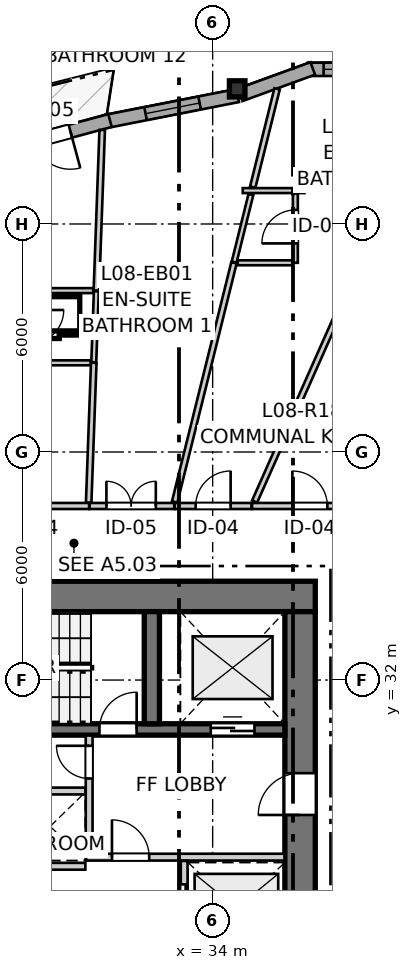
"""IFC4 building model, lengths in metres.
Left out: names, types, materials, properties, quantities, classifications, styles, units other than length and angle.
Written with IfcOpenShell. Run it as: python <this file> out.ifc"""

import sys

from ifc_helpers import new_model, si_unit, direction, frame, frame_2d, origin, origin_2d, place, context, subcontext, project, spatial, rectangle, i_section, extrude, source, transform, mapped, element, fill, save


model = new_model("IFC4")
c1 = context("Model", 3, precision=1e-05, world=origin(), true_north=direction((0.0, 1.0)))
c2 = subcontext(c1, "Body", "Model", "MODEL_VIEW")
j1 = project(units=[si_unit("LENGTHUNIT", "METRE"), si_unit("PLANEANGLEUNIT", "RADIAN")], contexts=[c1])
p1 = place(None, origin())
s1 = spatial("IfcSite", under=j1, at=p1, CompositionType="ELEMENT")
p2 = place(p1, origin())
s2 = spatial("IfcBuilding", under=s1, at=p2, CompositionType="ELEMENT")
p3 = place(p2, frame((0.0, 0.0, 30.2)))
s3 = spatial("IfcBuildingStorey", under=s2, at=p3, CompositionType="ELEMENT", Elevation=30.2)
p4 = place(p3, frame((36.7, 34.2, 0.0), z_axis=(0.0, 0.0, 1.0), x_axis=(-1.0, 0.0, 0.0)))
e1 = element("IfcWall", 1, at=p4, inside=s3, PredefinedType="SHEAR", context=c2, shape_type="SweptSolid", body=[
    extrude(rectangle(XDim=12.7, YDim=0.8, at=frame_2d((6.35, 0.0))), origin(), (0.0, 0.0, 1.0), 2.935),
])
p5 = place(p3, frame((36.3, 18.2, 0.0), z_axis=(0.0, 0.0, 1.0), x_axis=(0.0, 1.0, 0.0)))
e2 = element("IfcWall", 2, at=p5, inside=s3, PredefinedType="SHEAR", context=c2, shape_type="SweptSolid", body=[
    extrude(rectangle(XDim=15.6, YDim=0.8, at=frame_2d((7.8, 0.0))), origin(), (0.0, 0.0, 1.0), 2.935),
])
p6 = place(p5, frame((4.25, 0.0, 0.0)))
e3 = element("IfcOpeningElement", 3, at=p6, cuts=e2, PredefinedType="OPENING", context=c2, shape_type="SweptSolid", body=[
    extrude(rectangle(XDim=1.1, YDim=2.15, at=frame_2d((0.55, 1.075))), frame((0.0, 0.41, 0.0), z_axis=(0.0, -1.0, 0.0), x_axis=(1.0, 0.0, 0.0)), (0.0, 0.0, 1.0), 0.82),
])
p7 = place(p5, frame((10.25, 0.0, 0.0)))
e4 = element("IfcOpeningElement", 4, at=p7, cuts=e2, PredefinedType="OPENING", context=c2, shape_type="SweptSolid", body=[
    extrude(rectangle(XDim=1.1, YDim=2.15, at=frame_2d((0.55, 1.075))), frame((0.0, 0.41, 0.0), z_axis=(0.0, -1.0, 0.0), x_axis=(1.0, 0.0, 0.0)), (0.0, 0.0, 1.0), 0.82),
])
p8 = place(p3, frame((24.8, 30.7, 0.0), z_axis=(0.0, 0.0, 1.0), x_axis=(1.0, 0.0, 0.0)))
e5 = element("IfcWall", 5, at=p8, inside=s3, PredefinedType="SHEAR", context=c2, shape_type="SweptSolid", body=[
    extrude(rectangle(XDim=11.1, YDim=0.3, at=frame_2d((5.55, 0.0))), origin(), (0.0, 0.0, 1.0), 2.935),
])
p9 = place(p8, frame((6.22, 0.0, 0.0)))
e6 = element("IfcOpeningElement", 6, at=p9, cuts=e5, PredefinedType="OPENING", context=c2, shape_type="SweptSolid", body=[
    extrude(rectangle(XDim=0.98, YDim=2.15, at=frame_2d((0.49, 1.075))), frame((0.0, 0.16, 0.0), z_axis=(0.0, -1.0, 0.0), x_axis=(1.0, 0.0, 0.0)), (0.0, 0.0, 1.0), 0.32),
])
p10 = place(p8, frame((9.15, 0.0, 0.0)))
e7 = element("IfcOpeningElement", 7, at=p10, cuts=e5, PredefinedType="OPENING", context=c2, shape_type="SweptSolid", body=[
    extrude(rectangle(XDim=1.15, YDim=2.15, at=frame_2d((0.575, 1.075))), frame((0.0, 0.16, 0.0), z_axis=(0.0, -1.0, 0.0), x_axis=(1.0, 0.0, 0.0)), (0.0, 0.0, 1.0), 0.32),
])
p11 = place(p3, frame((32.4, 30.85, 0.0), z_axis=(0.0, 0.0, 1.0), x_axis=(0.0, 1.0, 0.0)))
e8 = element("IfcWall", 8, at=p11, inside=s3, PredefinedType="SHEAR", context=c2, shape_type="SweptSolid", body=[
    extrude(rectangle(XDim=2.95, YDim=0.4, at=frame_2d((1.475, 0.0))), origin(), (0.0, 0.0, 1.0), 2.935),
])
m1 = source(origin(), c2, "Body", "SweptSolid", [
    extrude(i_section(OverallWidth=0.409, OverallDepth=0.425, WebThickness=0.03, FlangeThickness=0.048, FilletRadius=0.015, at=origin_2d()), origin(), (0.0, 0.0, 1.0), 2.935),
])
p12 = place(p3, frame((34.645, 47.555, 0.0), z_axis=(0.0, 0.0, 1.0), x_axis=(1.0, 0.0, 0.0)))
e9 = element("IfcColumn", 9, at=p12, inside=s3, PredefinedType="PILASTER", context=c2, shape_type="MappedRepresentation", body=[
    mapped(m1, transform((0.0, 0.0, 0.0), x_axis=(1.0, 0.0, 0.0), y_axis=(0.0, 1.0, 0.0), z_axis=(0.0, 0.0, 1.0), scale=1.0)),
])
p13 = place(p3, frame((38.59, 48.069, 0.0), z_axis=(0.0, 0.0, 1.0), x_axis=(-1.0, 0.0, 0.0)))
e10 = element("IfcWall", 10, at=p13, inside=s3, PredefinedType="SOLIDWALL", context=c2, shape_type="SweptSolid", body=[
    extrude(rectangle(XDim=2.09, YDim=0.35, at=frame_2d((1.045, 0.0))), origin(), (0.0, 0.0, 1.0), 2.415),
])
p14 = place(p13, frame((0.42, 0.0, 0.82)))
e11 = element("IfcOpeningElement", 11, at=p14, cuts=e10, PredefinedType="OPENING", context=c2, shape_type="SweptSolid", body=[
    extrude(rectangle(XDim=1.25, YDim=1.35, at=frame_2d((0.625, 0.675))), frame((0.0, 0.185, 0.0), z_axis=(0.0, -1.0, 0.0), x_axis=(1.0, 0.0, 0.0)), (0.0, 0.0, 1.0), 0.37),
])
p15 = place(p3, frame((36.633, 48.093, 0.0), z_axis=(0.0, 0.0, 1.0), x_axis=(-0.939691662178, -0.342022777067, 0.0)))
e12 = element("IfcWall", 12, at=p15, inside=s3, PredefinedType="SOLIDWALL", context=c2, shape_type="SweptSolid", body=[
    extrude(rectangle(XDim=2.032, YDim=0.35, at=frame_2d((1.016, 0.0))), origin(), (0.0, 0.0, 1.0), 2.415),
])
p16 = place(p3, frame((34.659, 47.38, 0.0), z_axis=(0.0, 0.0, 1.0), x_axis=(-0.981222284826, -0.19288034571, 0.0)))
e13 = element("IfcWall", 13, at=p16, inside=s3, PredefinedType="SOLIDWALL", context=c2, shape_type="SweptSolid", body=[
    extrude(rectangle(XDim=3.512, YDim=0.35, at=frame_2d((1.756, 0.0))), origin(), (0.0, 0.0, 1.0), 2.415),
])
p17 = place(p16, frame((1.021, 0.0, 0.82)))
e14 = element("IfcOpeningElement", 14, at=p17, cuts=e13, PredefinedType="OPENING", context=c2, shape_type="SweptSolid", body=[
    extrude(rectangle(XDim=1.45, YDim=1.25, at=frame_2d((0.725, 0.625))), frame((0.0, 0.185, 0.0), z_axis=(0.0, -1.0, 0.0), x_axis=(1.0, 0.0, 0.0)), (0.0, 0.0, 1.0), 0.37),
])
p18 = place(p3, frame((31.298, 46.722, 0.0), z_axis=(0.0, 0.0, 1.0), x_axis=(-0.965455913242, -0.260566459057, 0.0)))
e15 = element("IfcWall", 15, at=p18, inside=s3, PredefinedType="SOLIDWALL", context=c2, shape_type="SweptSolid", body=[
    extrude(rectangle(XDim=3.159, YDim=0.35, at=frame_2d((1.58, 0.0))), origin(), (0.0, 0.0, 1.0), 2.415),
])
p19 = place(p18, frame((1.08, 0.0, 0.0)))
e16 = element("IfcOpeningElement", 16, at=p19, cuts=e15, PredefinedType="OPENING", context=c2, shape_type="SweptSolid", body=[
    extrude(rectangle(XDim=1.0, YDim=2.1, at=frame_2d((0.5, 1.05))), frame((0.0, 0.185, 0.0), z_axis=(0.0, -1.0, 0.0), x_axis=(1.0, 0.0, 0.0)), (0.0, 0.0, 1.0), 0.37),
])
p20 = place(p3, frame((30.75, 27.43, 0.0), z_axis=(0.0, 0.0, 1.0), x_axis=(0.0, 1.0, 0.0)))
e17 = element("IfcWall", 17, at=p20, inside=s3, PredefinedType="PARTITIONING", context=c2, shape_type="SweptSolid", body=[
    extrude(rectangle(XDim=3.11, YDim=0.18, at=frame_2d((1.555, 0.0))), origin(), (0.0, 0.0, 1.0), 2.935),
])
p21 = place(p20, frame((1.98, 0.0, 0.0)))
e18 = element("IfcOpeningElement", 18, at=p21, cuts=e17, PredefinedType="OPENING", context=c2, shape_type="SweptSolid", body=[
    extrude(rectangle(XDim=0.86, YDim=2.05, at=frame_2d((0.43, 1.025))), frame((0.0, 0.1, 0.0), z_axis=(0.0, -1.0, 0.0), x_axis=(1.0, 0.0, 0.0)), (0.0, 0.0, 1.0), 0.2),
])
p22 = place(p3, frame((30.67, 27.34, 0.0), z_axis=(0.0, 0.0, 1.0), x_axis=(1.0, 0.0, 0.0)))
e19 = element("IfcWall", 19, at=p22, inside=s3, PredefinedType="PARTITIONING", context=c2, shape_type="SweptSolid", body=[
    extrude(rectangle(XDim=5.22, YDim=0.18, at=frame_2d((2.61, 0.0))), origin(), (0.0, 0.0, 1.0), 2.935),
])
p23 = place(p22, frame((0.68, 0.0, 0.0)))
e20 = element("IfcOpeningElement", 20, at=p23, cuts=e19, PredefinedType="OPENING", context=c2, shape_type="SweptSolid", body=[
    extrude(rectangle(XDim=0.98, YDim=2.15, at=frame_2d((0.49, 1.075))), frame((0.0, 0.1, 0.0), z_axis=(0.0, -1.0, 0.0), x_axis=(1.0, 0.0, 0.0)), (0.0, 0.0, 1.0), 0.2),
])
p24 = place(p3, frame((33.25, 24.76, 0.0), z_axis=(0.0, 0.0, 1.0), x_axis=(0.0, 1.0, 0.0)))
e21 = element("IfcWall", 21, at=p24, inside=s3, PredefinedType="PARTITIONING", context=c2, shape_type="SweptSolid", body=[
    extrude(rectangle(XDim=2.48, YDim=0.18, at=frame_2d((1.24, 0.0))), origin(), (0.0, 0.0, 1.0), 2.935),
])
p25 = place(p24, frame((0.615, 0.0, 0.0)))
e22 = element("IfcOpeningElement", 22, at=p25, cuts=e21, PredefinedType="OPENING", context=c2, shape_type="SweptSolid", body=[
    extrude(rectangle(XDim=1.25, YDim=2.15, at=frame_2d((0.625, 1.075))), frame((0.0, 0.1, 0.0), z_axis=(0.0, -1.0, 0.0), x_axis=(1.0, 0.0, 0.0)), (0.0, 0.0, 1.0), 0.2),
])
p26 = place(p3, frame((24.81, 29.08, 0.0), z_axis=(0.0, 0.0, 1.0), x_axis=(1.0, 0.0, 0.0)))
e23 = element("IfcWall", 23, at=p26, inside=s3, PredefinedType="PARTITIONING", context=c2, shape_type="SweptSolid", body=[
    extrude(rectangle(XDim=5.84, YDim=0.18, at=frame_2d((2.92, 0.0))), origin(), (0.0, 0.0, 1.0), 2.935),
])
p27 = place(p3, frame((28.825, 27.1, 0.0), z_axis=(0.0, 0.0, 1.0), x_axis=(1.0, 0.0, 0.0)))
e24 = element("IfcWall", 24, at=p27, inside=s3, PredefinedType="PARTITIONING", context=c2, shape_type="SweptSolid", body=[
    extrude(rectangle(XDim=1.825, YDim=0.18, at=frame_2d((0.913, 0.0))), origin(), (0.0, 0.0, 1.0), 2.935),
])
p28 = place(p3, frame((35.036, 36.58, 0.0), z_axis=(0.0, 0.0, 1.0), x_axis=(1.0, 0.0, 0.0)))
e25 = element("IfcWall", 25, at=p28, inside=s3, PredefinedType="PARTITIONING", context=c2, shape_type="SweptSolid", body=[
    extrude(rectangle(XDim=3.045, YDim=0.16, at=frame_2d((1.522, 0.0))), origin(), (0.0, 0.0, 1.0), 2.935),
])
p29 = place(p28, frame((1.062, 0.0, 0.0)))
e26 = element("IfcOpeningElement", 26, at=p29, cuts=e25, PredefinedType="OPENING", context=c2, shape_type="SweptSolid", body=[
    extrude(rectangle(XDim=0.92, YDim=2.1, at=frame_2d((0.46, 1.05))), frame((0.0, 0.09, 0.0), z_axis=(0.0, -1.0, 0.0), x_axis=(1.0, 0.0, 0.0)), (0.0, 0.0, 1.0), 0.18),
])
p30 = place(p3, frame((27.846, 36.58, 0.0), z_axis=(0.0, 0.0, 1.0), x_axis=(1.0, 0.0, 0.0)))
e27 = element("IfcWall", 27, at=p30, inside=s3, PredefinedType="PARTITIONING", context=c2, shape_type="SweptSolid", body=[
    extrude(rectangle(XDim=2.903, YDim=0.16, at=frame_2d((1.452, 0.0))), origin(), (0.0, 0.0, 1.0), 2.935),
])
p31 = place(p30, frame((0.969, 0.0, 0.0)))
e28 = element("IfcOpeningElement", 28, at=p31, cuts=e27, PredefinedType="OPENING", context=c2, shape_type="SweptSolid", body=[
    extrude(rectangle(XDim=0.92, YDim=2.1, at=frame_2d((0.46, 1.05))), frame((0.0, 0.09, 0.0), z_axis=(0.0, -1.0, 0.0), x_axis=(1.0, 0.0, 0.0)), (0.0, 0.0, 1.0), 0.18),
])
p32 = place(p3, frame((30.764, 36.58, 0.0), z_axis=(0.0, 0.0, 1.0), x_axis=(1.0, 0.0, 0.0)))
e29 = element("IfcWall", 29, at=p32, inside=s3, PredefinedType="PARTITIONING", context=c2, shape_type="SweptSolid", body=[
    extrude(rectangle(XDim=2.225, YDim=0.16, at=frame_2d((1.113, 0.0))), origin(), (0.0, 0.0, 1.0), 2.935),
])
p33 = place(p32, frame((0.44, 0.0, 0.0)))
e30 = element("IfcOpeningElement", 30, at=p33, cuts=e29, PredefinedType="OPENING", context=c2, shape_type="SweptSolid", body=[
    extrude(rectangle(XDim=1.3, YDim=2.1, at=frame_2d((0.65, 1.05))), frame((0.0, 0.09, 0.0), z_axis=(0.0, -1.0, 0.0), x_axis=(1.0, 0.0, 0.0)), (0.0, 0.0, 1.0), 0.18),
])
p34 = place(p3, frame((33.004, 36.58, 0.0), z_axis=(0.0, 0.0, 1.0), x_axis=(1.0, 0.0, 0.0)))
e31 = element("IfcWall", 31, at=p34, inside=s3, PredefinedType="PARTITIONING", context=c2, shape_type="SweptSolid", body=[
    extrude(rectangle(XDim=2.017, YDim=0.16, at=frame_2d((1.009, 0.0))), origin(), (0.0, 0.0, 1.0), 2.935),
])
p35 = place(p34, frame((0.549, 0.0, 0.0)))
e32 = element("IfcOpeningElement", 32, at=p35, cuts=e31, PredefinedType="OPENING", context=c2, shape_type="SweptSolid", body=[
    extrude(rectangle(XDim=0.92, YDim=2.1, at=frame_2d((0.46, 1.05))), frame((0.0, 0.09, 0.0), z_axis=(0.0, -1.0, 0.0), x_axis=(1.0, 0.0, 0.0)), (0.0, 0.0, 1.0), 0.18),
])
p36 = place(p3, frame((36.176, 42.979, 0.0), z_axis=(0.0, 0.0, 1.0), x_axis=(0.0, 1.0, 0.0)))
e33 = element("IfcWall", 33, at=p36, inside=s3, PredefinedType="PARTITIONING", context=c2, shape_type="SweptSolid", body=[
    extrude(rectangle(XDim=1.827, YDim=0.13, at=frame_2d((0.914, 0.0))), origin(), (0.0, 0.0, 1.0), 2.935),
])
p37 = place(p36, frame((0.51, 0.0, 0.0)))
e34 = element("IfcOpeningElement", 34, at=p37, cuts=e33, PredefinedType="OPENING", context=c2, shape_type="SweptSolid", body=[
    extrude(rectangle(XDim=0.88, YDim=2.05, at=frame_2d((0.44, 1.025))), frame((0.0, 0.075, 0.0), z_axis=(0.0, -1.0, 0.0), x_axis=(1.0, 0.0, 0.0)), (0.0, 0.0, 1.0), 0.15),
])
p38 = place(p3, frame((35.104, 36.697, 0.0), z_axis=(0.0, 0.0, 1.0), x_axis=(0.406121034368, 0.913819295837, 0.0)))
e35 = element("IfcWall", 35, at=p38, inside=s3, PredefinedType="PARTITIONING", context=c2, shape_type="SweptSolid", body=[
    extrude(rectangle(XDim=11.695, YDim=0.145, at=frame_2d((5.848, 0.0))), origin(), (0.0, 0.0, 1.0), 2.935),
])
p39 = place(p3, frame((33.0, 36.685, 0.0), z_axis=(0.0, 0.0, 1.0), x_axis=(0.240736846637, 0.970590423748, 0.0)))
e36 = element("IfcWall", 36, at=p39, inside=s3, PredefinedType="PARTITIONING", context=c2, shape_type="SweptSolid", body=[
    extrude(rectangle(XDim=6.484, YDim=0.145, at=frame_2d((3.242, 0.0))), origin(), (0.0, 0.0, 1.0), 2.935),
])
p40 = place(p3, frame((30.94, 42.247, 0.0), z_axis=(0.0, 0.0, 1.0), x_axis=(0.03624948077, 0.999342771597, 0.0)))
e37 = element("IfcWall", 37, at=p40, inside=s3, PredefinedType="PARTITIONING", context=c2, shape_type="SweptSolid", body=[
    extrude(rectangle(XDim=4.229, YDim=0.145, at=frame_2d((2.115, 0.0))), origin(), (0.0, 0.0, 1.0), 2.935),
])
p41 = place(p3, frame((30.737, 36.671, 0.0), z_axis=(0.0, 0.0, 1.0), x_axis=(0.036368539535, 0.999338445839, 0.0)))
e38 = element("IfcWall", 38, at=p41, inside=s3, PredefinedType="PARTITIONING", context=c2, shape_type="SweptSolid", body=[
    extrude(rectangle(XDim=3.679, YDim=0.145, at=frame_2d((1.839, 0.0))), origin(), (0.0, 0.0, 1.0), 2.935),
])
p42 = place(p3, frame((35.054, 44.969, 0.0), z_axis=(0.0, 0.0, 1.0), x_axis=(0.240615617293, 0.970620484388, 0.0)))
e39 = element("IfcWall", 39, at=p42, inside=s3, PredefinedType="PARTITIONING", context=c2, shape_type="SweptSolid", body=[
    extrude(rectangle(XDim=2.664, YDim=0.145, at=frame_2d((1.332, 0.0))), origin(), (0.0, 0.0, 1.0), 2.935),
])
p43 = place(p3, frame((34.565, 42.994, 0.0), z_axis=(0.0, 0.0, 1.0), x_axis=(0.240658084914, 0.970609955732, 0.0)))
e40 = element("IfcWall", 40, at=p43, inside=s3, PredefinedType="PARTITIONING", context=c2, shape_type="SweptSolid", body=[
    extrude(rectangle(XDim=1.836, YDim=0.13, at=frame_2d((0.918, 0.0))), origin(), (0.0, 0.0, 1.0), 2.935),
])
p44 = place(p3, frame((30.872, 40.362, 0.0), z_axis=(0.0, 0.0, 1.0), x_axis=(0.036273279858, 0.999341908042, 0.0)))
e41 = element("IfcWall", 41, at=p44, inside=s3, PredefinedType="PARTITIONING", context=c2, shape_type="SweptSolid", body=[
    extrude(rectangle(XDim=1.871, YDim=0.13, at=frame_2d((0.936, 0.0))), origin(), (0.0, 0.0, 1.0), 2.935),
])
p45 = place(p3, frame((29.274, 42.247, 0.0), z_axis=(0.0, 0.0, 1.0), x_axis=(1.0, 0.0, 0.0)))
e42 = element("IfcWall", 42, at=p45, inside=s3, PredefinedType="PARTITIONING", context=c2, shape_type="SweptSolid", body=[
    extrude(rectangle(XDim=1.583, YDim=0.13, at=frame_2d((0.792, 0.0))), origin(), (0.0, 0.0, 1.0), 2.503),
])
p46 = place(p3, frame((29.274, 40.347, 0.0), z_axis=(0.0, 0.0, 1.0), x_axis=(1.0, 0.0, 0.0)))
e43 = element("IfcWall", 43, at=p46, inside=s3, PredefinedType="PARTITIONING", context=c2, shape_type="SweptSolid", body=[
    extrude(rectangle(XDim=1.514, YDim=0.13, at=frame_2d((0.757, 0.0))), origin(), (0.0, 0.0, 1.0), 2.935),
])
p47 = place(p3, frame((34.66, 42.979, 0.0), z_axis=(0.0, 0.0, 1.0), x_axis=(1.0, 0.0, 0.0)))
e44 = element("IfcWall", 44, at=p47, inside=s3, PredefinedType="PARTITIONING", context=c2, shape_type="SweptSolid", body=[
    extrude(rectangle(XDim=1.443, YDim=0.13, at=frame_2d((0.722, 0.0))), origin(), (0.0, 0.0, 1.0), 2.935),
])
p48 = place(p3, frame((34.792, 44.879, 0.0), z_axis=(0.0, 0.0, 1.0), x_axis=(1.0, 0.0, 0.0)))
e45 = element("IfcWall", 45, at=p48, inside=s3, PredefinedType="PARTITIONING", context=c2, shape_type="SweptSolid", body=[
    extrude(rectangle(XDim=1.624, YDim=0.13, at=frame_2d((0.812, 0.0))), origin(), (0.0, 0.0, 1.0), 2.935),
])
m2 = source(origin(), c2, "Body", "SweptSolid", [
    extrude(rectangle(XDim=1.25, YDim=1.35, at=frame_2d((0.625, 0.675))), frame((0.0, 0.03, 0.0), z_axis=(0.0, -1.0, 0.0), x_axis=(1.0, 0.0, 0.0)), (0.0, 0.0, 1.0), 0.06),
])
p49 = place(p14, origin())
e46 = element("IfcWindow", 46, at=p49, inside=s3, PartitioningType="SINGLE_PANEL", PredefinedType="WINDOW", context=c2, shape_type="MappedRepresentation", body=[
    mapped(m2, transform((0.0, 0.0, 0.0), x_axis=(1.0, 0.0, 0.0), y_axis=(0.0, 1.0, 0.0), z_axis=(0.0, 0.0, 1.0), scale=1.0)),
])
fill(e11, e46)
m3 = source(origin(), c2, "Body", "SweptSolid", [
    extrude(rectangle(XDim=1.45, YDim=1.25, at=frame_2d((0.725, 0.625))), frame((0.0, 0.03, 0.0), z_axis=(0.0, -1.0, 0.0), x_axis=(1.0, 0.0, 0.0)), (0.0, 0.0, 1.0), 0.06),
])
p50 = place(p17, origin())
e47 = element("IfcWindow", 47, at=p50, inside=s3, PartitioningType="SINGLE_PANEL", PredefinedType="WINDOW", context=c2, shape_type="MappedRepresentation", body=[
    mapped(m3, transform((0.0, 0.0, 0.0), x_axis=(1.0, 0.0, 0.0), y_axis=(0.0, 1.0, 0.0), z_axis=(0.0, 0.0, 1.0), scale=1.0)),
])
fill(e14, e47)
m4 = source(origin(), c2, "Body", "SweptSolid", [
    extrude(rectangle(XDim=1.0, YDim=2.1, at=frame_2d((0.5, 1.05))), frame((0.0, 0.025, 0.0), z_axis=(0.0, -1.0, 0.0), x_axis=(1.0, 0.0, 0.0)), (0.0, 0.0, 1.0), 0.05),
])
p51 = place(p19, origin())
e48 = element("IfcDoor", 48, at=p51, inside=s3, OperationType="SINGLE_SWING_LEFT", PredefinedType="DOOR", context=c2, shape_type="MappedRepresentation", body=[
    mapped(m4, transform((0.0, 0.0, 0.0), x_axis=(1.0, 0.0, 0.0), y_axis=(0.0, 1.0, 0.0), z_axis=(0.0, 0.0, 1.0), scale=1.0)),
])
fill(e16, e48)
m5 = source(origin(), c2, "Body", "SweptSolid", [
    extrude(rectangle(XDim=0.98, YDim=2.15, at=frame_2d((0.49, 1.075))), frame((0.0, 0.025, 0.0), z_axis=(0.0, -1.0, 0.0), x_axis=(1.0, 0.0, 0.0)), (0.0, 0.0, 1.0), 0.05),
])
p52 = place(p9, origin())
e49 = element("IfcDoor", 49, at=p52, inside=s3, OperationType="SINGLE_SWING_RIGHT", PredefinedType="DOOR", context=c2, shape_type="MappedRepresentation", body=[
    mapped(m5, transform((0.0, 0.0, 0.0), x_axis=(1.0, 0.0, 0.0), y_axis=(0.0, 1.0, 0.0), z_axis=(0.0, 0.0, 1.0), scale=1.0)),
])
fill(e6, e49)
m6 = source(origin(), c2, "Body", "SweptSolid", [
    extrude(rectangle(XDim=1.15, YDim=2.15, at=frame_2d((0.575, 1.075))), frame((0.0, 0.025, 0.0), z_axis=(0.0, -1.0, 0.0), x_axis=(1.0, 0.0, 0.0)), (0.0, 0.0, 1.0), 0.05),
])
p53 = place(p10, origin())
e50 = element("IfcDoor", 50, at=p53, inside=s3, OperationType="DOUBLE_DOOR_SLIDING", PredefinedType="DOOR", context=c2, shape_type="MappedRepresentation", body=[
    mapped(m6, transform((0.0, 0.0, 0.0), x_axis=(1.0, 0.0, 0.0), y_axis=(0.0, 1.0, 0.0), z_axis=(0.0, 0.0, 1.0), scale=1.0)),
])
fill(e7, e50)
m7 = source(origin(), c2, "Body", "SweptSolid", [
    extrude(rectangle(XDim=1.1, YDim=2.15, at=frame_2d((0.55, 1.075))), frame((0.0, 0.025, 0.0), z_axis=(0.0, -1.0, 0.0), x_axis=(1.0, 0.0, 0.0)), (0.0, 0.0, 1.0), 0.05),
])
p54 = place(p7, origin())
e51 = element("IfcDoor", 51, at=p54, inside=s3, OperationType="SINGLE_SWING_LEFT", PredefinedType="DOOR", context=c2, shape_type="MappedRepresentation", body=[
    mapped(m7, transform((0.0, 0.0, 0.0), x_axis=(1.0, 0.0, 0.0), y_axis=(0.0, 1.0, 0.0), z_axis=(0.0, 0.0, 1.0), scale=1.0)),
])
fill(e4, e51)
m8 = source(origin(), c2, "Body", "SweptSolid", [
    extrude(rectangle(XDim=0.86, YDim=2.05, at=frame_2d((0.43, 1.025))), frame((0.0, 0.025, 0.0), z_axis=(0.0, -1.0, 0.0), x_axis=(1.0, 0.0, 0.0)), (0.0, 0.0, 1.0), 0.05),
])
p55 = place(p21, origin())
e52 = element("IfcDoor", 52, at=p55, inside=s3, OperationType="SINGLE_SWING_RIGHT", PredefinedType="DOOR", context=c2, shape_type="MappedRepresentation", body=[
    mapped(m8, transform((0.0, 0.0, 0.0), x_axis=(1.0, 0.0, 0.0), y_axis=(0.0, 1.0, 0.0), z_axis=(0.0, 0.0, 1.0), scale=1.0)),
])
fill(e18, e52)
p56 = place(p23, origin())
e53 = element("IfcDoor", 53, at=p56, inside=s3, OperationType="SINGLE_SWING_LEFT", PredefinedType="DOOR", context=c2, shape_type="MappedRepresentation", body=[
    mapped(m5, transform((0.0, 0.0, 0.0), x_axis=(1.0, 0.0, 0.0), y_axis=(0.0, 1.0, 0.0), z_axis=(0.0, 0.0, 1.0), scale=1.0)),
])
fill(e20, e53)
m9 = source(origin(), c2, "Body", "SweptSolid", [
    extrude(rectangle(XDim=1.25, YDim=2.15, at=frame_2d((0.625, 1.075))), frame((0.0, 0.025, 0.0), z_axis=(0.0, -1.0, 0.0), x_axis=(1.0, 0.0, 0.0)), (0.0, 0.0, 1.0), 0.05),
])
p57 = place(p25, origin())
e54 = element("IfcDoor", 54, at=p57, inside=s3, OperationType="DOUBLE_DOOR_SLIDING", PredefinedType="DOOR", context=c2, shape_type="MappedRepresentation", body=[
    mapped(m9, transform((0.0, 0.0, 0.0), x_axis=(1.0, 0.0, 0.0), y_axis=(0.0, 1.0, 0.0), z_axis=(0.0, 0.0, 1.0), scale=1.0)),
])
fill(e22, e54)
m10 = source(origin(), c2, "Body", "SweptSolid", [
    extrude(rectangle(XDim=0.92, YDim=2.1, at=frame_2d((0.46, 1.05))), frame((0.0, 0.025, 0.0), z_axis=(0.0, -1.0, 0.0), x_axis=(1.0, 0.0, 0.0)), (0.0, 0.0, 1.0), 0.05),
])
p58 = place(p29, origin())
e55 = element("IfcDoor", 55, at=p58, inside=s3, OperationType="SINGLE_SWING_LEFT", PredefinedType="DOOR", context=c2, shape_type="MappedRepresentation", body=[
    mapped(m10, transform((0.0, 0.0, 0.0), x_axis=(1.0, 0.0, 0.0), y_axis=(0.0, 1.0, 0.0), z_axis=(0.0, 0.0, 1.0), scale=1.0)),
])
fill(e26, e55)
m11 = source(origin(), c2, "Body", "SweptSolid", [
    extrude(rectangle(XDim=1.3, YDim=2.1, at=frame_2d((0.65, 1.05))), frame((0.0, 0.025, 0.0), z_axis=(0.0, -1.0, 0.0), x_axis=(1.0, 0.0, 0.0)), (0.0, 0.0, 1.0), 0.05),
])
p59 = place(p33, origin())
e56 = element("IfcDoor", 56, at=p59, inside=s3, OperationType="DOUBLE_DOOR_SINGLE_SWING", PredefinedType="DOOR", context=c2, shape_type="MappedRepresentation", body=[
    mapped(m11, transform((0.0, 0.0, 0.0), x_axis=(1.0, 0.0, 0.0), y_axis=(0.0, 1.0, 0.0), z_axis=(0.0, 0.0, 1.0), scale=1.0)),
])
fill(e30, e56)
p60 = place(p35, origin())
e57 = element("IfcDoor", 57, at=p60, inside=s3, OperationType="SINGLE_SWING_RIGHT", PredefinedType="DOOR", context=c2, shape_type="MappedRepresentation", body=[
    mapped(m10, transform((0.0, 0.0, 0.0), x_axis=(1.0, 0.0, 0.0), y_axis=(0.0, 1.0, 0.0), z_axis=(0.0, 0.0, 1.0), scale=1.0)),
])
fill(e32, e57)
m12 = source(origin(), c2, "Body", "SweptSolid", [
    extrude(rectangle(XDim=0.88, YDim=2.05, at=frame_2d((0.44, 1.025))), frame((0.0, 0.025, 0.0), z_axis=(0.0, -1.0, 0.0), x_axis=(1.0, 0.0, 0.0)), (0.0, 0.0, 1.0), 0.05),
])
p61 = place(p37, origin())
e58 = element("IfcDoor", 58, at=p61, inside=s3, OperationType="SINGLE_SWING_LEFT", PredefinedType="DOOR", context=c2, shape_type="MappedRepresentation", body=[
    mapped(m12, transform((0.0, 0.0, 0.0), x_axis=(1.0, 0.0, 0.0), y_axis=(0.0, 1.0, 0.0), z_axis=(0.0, 0.0, 1.0), scale=1.0)),
])
fill(e34, e58)
save(model, sys.argv[1])
